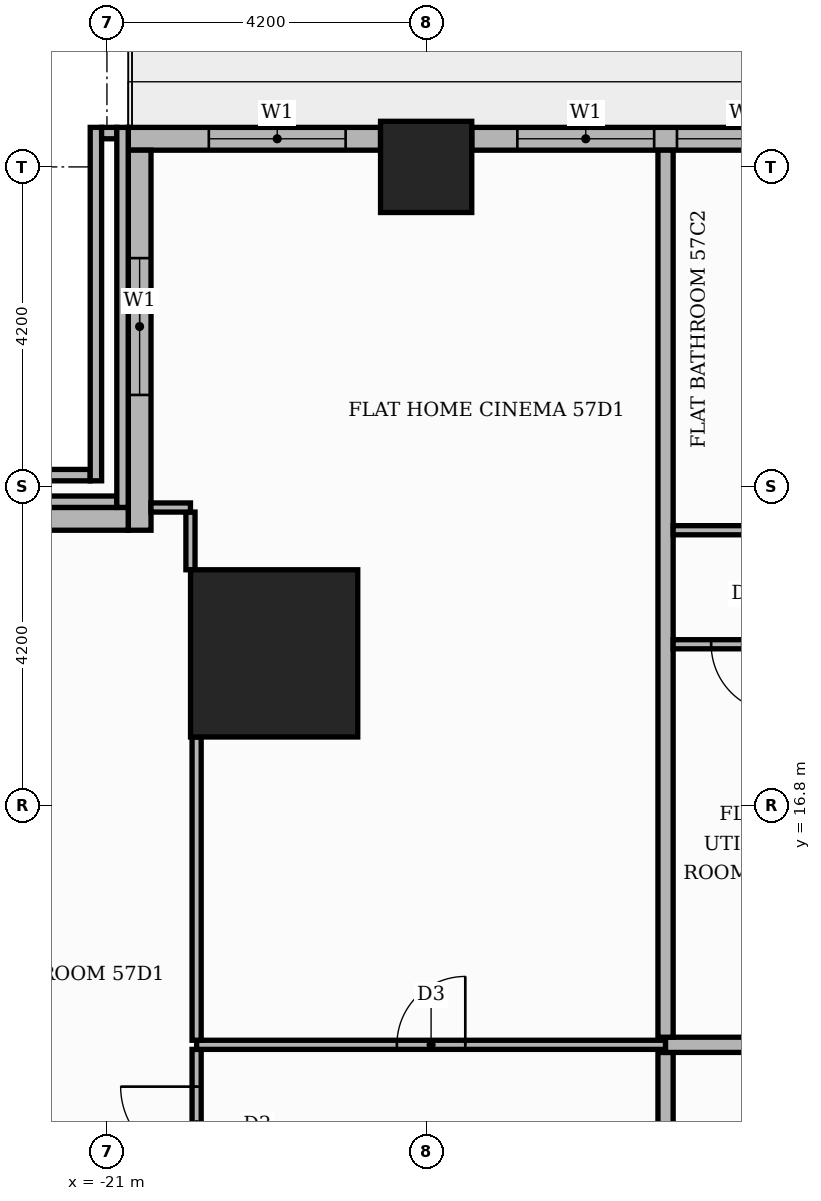
"""IFC4 building model, lengths in metres.
Left out: names, types, materials, properties, quantities, classifications, styles, units other than length and angle.
Written with IfcOpenShell. Run it as: python <this file> out.ifc"""

import sys

from ifc_helpers import new_model, si_unit, direction, frame, frame_2d, origin, origin_2d, place, context, subcontext, project, spatial, rectangle, extrude, element, fill, save


model = new_model("IFC4")
c1 = context("Model", 3, precision=1e-05, world=origin(), true_north=direction((0.0, 1.0)))
c2 = subcontext(c1, "Body", "Model", "MODEL_VIEW")
j1 = project(units=[si_unit("LENGTHUNIT", "METRE"), si_unit("PLANEANGLEUNIT", "RADIAN")], contexts=[c1])
p1 = place(None, origin())
s1 = spatial("IfcSite", under=j1, at=p1, CompositionType="ELEMENT")
p2 = place(p1, origin())
s2 = spatial("IfcBuilding", under=s1, at=p2, CompositionType="ELEMENT")
p3 = place(p2, frame((0.0, 0.0, 240.6)))
s3 = spatial("IfcBuildingStorey", under=s2, at=p3, CompositionType="ELEMENT", Elevation=240.6)
p4 = place(p3, frame((-18.8, 18.8, 0.0), z_axis=(0.0, 0.0, 1.0), x_axis=(1.0, 0.0, 0.0)))
e1 = element("IfcColumn", 1, at=p4, inside=s3, PredefinedType="COLUMN", context=c2, shape_type="SweptSolid", body=[
    extrude(rectangle(XDim=2.2, YDim=2.2, at=origin_2d()), origin(), (0.0, 0.0, 1.0), 3.9),
])
p5 = place(p3, frame((-16.8, 25.2, 0.0), z_axis=(0.0, 0.0, 1.0), x_axis=(1.0, 0.0, 0.0)))
e2 = element("IfcColumn", 2, at=p5, inside=s3, PredefinedType="COLUMN", context=c2, shape_type="SweptSolid", body=[
    extrude(rectangle(XDim=1.2, YDim=1.2, at=origin_2d()), origin(), (0.0, 0.0, 1.0), 3.9),
])
p6 = place(p3, frame((-9.0, 25.57, 0.0), z_axis=(0.0, 0.0, 1.0), x_axis=(-1.0, 0.0, 0.0)))
e3 = element("IfcWall", 3, at=p6, inside=s3, PredefinedType="STANDARD", context=c2, shape_type="SweptSolid", body=[
    extrude(rectangle(XDim=7.2, YDim=0.3, at=frame_2d((3.6, 0.0))), origin(), (0.0, 0.0, 1.0), 3.48),
])
p7 = place(p6, frame((0.6, 0.0, 0.9)))
e4 = element("IfcOpeningElement", 4, at=p7, cuts=e3, PredefinedType="OPENING", context=c2, shape_type="SweptSolid", body=[
    extrude(rectangle(XDim=1.8, YDim=2.1, at=frame_2d((0.9, 1.05))), frame((0.0, 0.16, 0.0), z_axis=(0.0, -1.0, 0.0), x_axis=(1.0, 0.0, 0.0)), (0.0, 0.0, 1.0), 0.32),
])
p8 = place(p6, frame((2.7, 0.0, 0.9)))
e5 = element("IfcOpeningElement", 5, at=p8, cuts=e3, PredefinedType="OPENING", context=c2, shape_type="SweptSolid", body=[
    extrude(rectangle(XDim=1.8, YDim=2.1, at=frame_2d((0.9, 1.05))), frame((0.0, 0.16, 0.0), z_axis=(0.0, -1.0, 0.0), x_axis=(1.0, 0.0, 0.0)), (0.0, 0.0, 1.0), 0.32),
])
p9 = place(p6, frame((4.8, 0.0, 0.9)))
e6 = element("IfcOpeningElement", 6, at=p9, cuts=e3, PredefinedType="OPENING", context=c2, shape_type="SweptSolid", body=[
    extrude(rectangle(XDim=1.8, YDim=2.1, at=frame_2d((0.9, 1.05))), frame((0.0, 0.16, 0.0), z_axis=(0.0, -1.0, 0.0), x_axis=(1.0, 0.0, 0.0)), (0.0, 0.0, 1.0), 0.32),
])
p10 = place(p3, frame((-17.4, 25.57, 0.0), z_axis=(0.0, 0.0, 1.0), x_axis=(-1.0, 0.0, 0.0)))
e7 = element("IfcWall", 7, at=p10, inside=s3, PredefinedType="STANDARD", context=c2, shape_type="SweptSolid", body=[
    extrude(rectangle(XDim=3.32, YDim=0.3, at=frame_2d((1.66, 0.0))), origin(), (0.0, 0.0, 1.0), 3.48),
])
p11 = place(p10, frame((0.459, 0.0, 0.9)))
e8 = element("IfcOpeningElement", 8, at=p11, cuts=e7, PredefinedType="OPENING", context=c2, shape_type="SweptSolid", body=[
    extrude(rectangle(XDim=1.8, YDim=2.1, at=frame_2d((0.9, 1.05))), frame((0.0, 0.16, 0.0), z_axis=(0.0, -1.0, 0.0), x_axis=(1.0, 0.0, 0.0)), (0.0, 0.0, 1.0), 0.32),
])
p12 = place(p3, frame((-20.57, 25.42, 0.0), z_axis=(0.0, 0.0, 1.0), x_axis=(0.0, -1.0, 0.0)))
e9 = element("IfcWall", 9, at=p12, inside=s3, PredefinedType="STANDARD", context=c2, shape_type="SweptSolid", body=[
    extrude(rectangle(XDim=5.0, YDim=0.3, at=frame_2d((2.5, 0.0))), origin(), (0.0, 0.0, 1.0), 3.48),
])
p13 = place(p12, frame((1.42, 0.0, 0.9)))
e10 = element("IfcOpeningElement", 10, at=p13, cuts=e9, PredefinedType="OPENING", context=c2, shape_type="SweptSolid", body=[
    extrude(rectangle(XDim=1.8, YDim=2.1, at=frame_2d((0.9, 1.05))), frame((0.0, 0.16, 0.0), z_axis=(0.0, -1.0, 0.0), x_axis=(1.0, 0.0, 0.0)), (0.0, 0.0, 1.0), 0.32),
])
p14 = place(p3, frame((-20.72, 20.57, 0.0), z_axis=(0.0, 0.0, 1.0), x_axis=(-1.0, 0.0, 0.0)))
e11 = element("IfcWall", 11, at=p14, inside=s3, PredefinedType="STANDARD", context=c2, shape_type="SweptSolid", body=[
    extrude(rectangle(XDim=5.0, YDim=0.3, at=frame_2d((2.5, 0.0))), origin(), (0.0, 0.0, 1.0), 3.48),
])
p15 = place(p14, frame((1.48, 0.0, 0.9)))
e12 = element("IfcOpeningElement", 12, at=p15, cuts=e11, PredefinedType="OPENING", context=c2, shape_type="SweptSolid", body=[
    extrude(rectangle(XDim=1.8, YDim=2.1, at=frame_2d((0.9, 1.05))), frame((0.0, 0.16, 0.0), z_axis=(0.0, -1.0, 0.0), x_axis=(1.0, 0.0, 0.0)), (0.0, 0.0, 1.0), 0.32),
])
p16 = place(p3, frame((-25.57, 21.145, 0.0), z_axis=(0.0, 0.0, 1.0), x_axis=(1.0, 0.0, 0.0)))
e13 = element("IfcWall", 13, at=p16, inside=s3, PredefinedType="PARAPET", context=c2, shape_type="SweptSolid", body=[
    extrude(rectangle(XDim=4.35, YDim=0.15, at=frame_2d((2.175, 0.0))), origin(), (0.0, 0.0, 1.0), 1.1),
])
p17 = place(p3, frame((-25.57, 20.795, 0.0), z_axis=(0.0, 0.0, 1.0), x_axis=(1.0, 0.0, 0.0)))
e14 = element("IfcWall", 14, at=p17, inside=s3, PredefinedType="PARAPET", context=c2, shape_type="SweptSolid", body=[
    extrude(rectangle(XDim=4.7, YDim=0.15, at=frame_2d((2.35, 0.0))), origin(), (0.0, 0.0, 1.0), 1.1),
])
p18 = place(p3, frame((-21.145, 21.07, 0.0), z_axis=(0.0, 0.0, 1.0), x_axis=(0.0, 1.0, 0.0)))
e15 = element("IfcWall", 15, at=p18, inside=s3, PredefinedType="PARAPET", context=c2, shape_type="SweptSolid", body=[
    extrude(rectangle(XDim=4.65, YDim=0.15, at=frame_2d((2.325, 0.0))), origin(), (0.0, 0.0, 1.0), 1.1),
])
p19 = place(p3, frame((-21.07, 25.645, 0.0), z_axis=(0.0, 0.0, 1.0), x_axis=(1.0, 0.0, 0.0)))
e16 = element("IfcWall", 16, at=p19, inside=s3, PredefinedType="PARAPET", context=c2, shape_type="SweptSolid", body=[
    extrude(rectangle(XDim=0.2, YDim=0.15, at=frame_2d((0.1, 0.0))), origin(), (0.0, 0.0, 1.0), 1.1),
])
p20 = place(p3, frame((-20.795, 20.72, 0.0), z_axis=(0.0, 0.0, 1.0), x_axis=(0.0, 1.0, 0.0)))
e17 = element("IfcWall", 17, at=p20, inside=s3, PredefinedType="PARAPET", context=c2, shape_type="SweptSolid", body=[
    extrude(rectangle(XDim=5.0, YDim=0.15, at=frame_2d((2.5, 0.0))), origin(), (0.0, 0.0, 1.0), 1.1),
])
p21 = place(p3, frame((-13.65, 11.1, 0.0), z_axis=(0.0, 0.0, 1.0), x_axis=(0.0, 1.0, 0.0)))
e18 = element("IfcWall", 18, at=p21, inside=s3, PredefinedType="PARTITIONING", context=c2, shape_type="SweptSolid", body=[
    extrude(rectangle(XDim=2.45, YDim=0.2, at=frame_2d((1.225, 0.0))), origin(), (0.0, 0.0, 1.0), 3.48),
])
p22 = place(p3, frame((-19.82, 11.61, 0.0), z_axis=(0.0, 0.0, 1.0), x_axis=(0.0, 1.0, 0.0)))
e19 = element("IfcWall", 19, at=p22, inside=s3, PredefinedType="PARTITIONING", context=c2, shape_type="SweptSolid", body=[
    extrude(rectangle(XDim=1.98, YDim=0.12, at=frame_2d((0.99, 0.0))), origin(), (0.0, 0.0, 1.0), 3.48),
])
p23 = place(p22, frame((0.49, 0.0, 0.0)))
e20 = element("IfcOpeningElement", 20, at=p23, cuts=e19, PredefinedType="OPENING", context=c2, shape_type="SweptSolid", body=[
    extrude(rectangle(XDim=1.0, YDim=2.1, at=frame_2d((0.5, 1.05))), frame((0.0, 0.07, 0.0), z_axis=(0.0, -1.0, 0.0), x_axis=(1.0, 0.0, 0.0)), (0.0, 0.0, 1.0), 0.14),
])
p24 = place(p3, frame((-19.82, 13.65, 0.0), z_axis=(0.0, 0.0, 1.0), x_axis=(1.0, 0.0, 0.0)))
e21 = element("IfcWall", 21, at=p24, inside=s3, PredefinedType="PARTITIONING", context=c2, shape_type="SweptSolid", body=[
    extrude(rectangle(XDim=6.17, YDim=0.12, at=frame_2d((3.085, 0.0))), origin(), (0.0, 0.0, 1.0), 3.48),
])
p25 = place(p24, frame((2.635, 0.0, 0.0)))
e22 = element("IfcOpeningElement", 22, at=p25, cuts=e21, PredefinedType="OPENING", context=c2, shape_type="SweptSolid", body=[
    extrude(rectangle(XDim=0.9, YDim=2.1, at=frame_2d((0.45, 1.05))), frame((0.0, 0.07, 0.0), z_axis=(0.0, -1.0, 0.0), x_axis=(1.0, 0.0, 0.0)), (0.0, 0.0, 1.0), 0.14),
])
p26 = place(p3, frame((-13.65, 13.65, 0.0), z_axis=(0.0, 0.0, 1.0), x_axis=(1.0, 0.0, 0.0)))
e23 = element("IfcWall", 23, at=p26, inside=s3, PredefinedType="PARTITIONING", context=c2, shape_type="SweptSolid", body=[
    extrude(rectangle(XDim=39.07, YDim=0.2, at=frame_2d((19.535, 0.0))), origin(), (0.0, 0.0, 1.0), 3.48),
])
p27 = place(p26, frame((24.65, 0.0, 0.0)))
e24 = element("IfcOpeningElement", 24, at=p27, cuts=e23, PredefinedType="OPENING", context=c2, shape_type="SweptSolid", body=[
    extrude(rectangle(XDim=1.1, YDim=2.4, at=frame_2d((0.55, 1.2))), frame((0.0, 0.11, 0.0), z_axis=(0.0, -1.0, 0.0), x_axis=(1.0, 0.0, 0.0)), (0.0, 0.0, 1.0), 0.22),
])
p28 = place(p26, frame((12.05, 0.0, 0.0)))
e25 = element("IfcOpeningElement", 25, at=p28, cuts=e23, PredefinedType="OPENING", context=c2, shape_type="SweptSolid", body=[
    extrude(rectangle(XDim=1.1, YDim=2.4, at=frame_2d((0.55, 1.2))), frame((0.0, 0.11, 0.0), z_axis=(0.0, -1.0, 0.0), x_axis=(1.0, 0.0, 0.0)), (0.0, 0.0, 1.0), 0.22),
])
p29 = place(p3, frame((-19.82, 13.71, 0.0), z_axis=(0.0, 0.0, 1.0), x_axis=(0.0, 1.0, 0.0)))
e26 = element("IfcWall", 26, at=p29, inside=s3, PredefinedType="PARTITIONING", context=c2, shape_type="SweptSolid", body=[
    extrude(rectangle(XDim=3.99, YDim=0.12, at=frame_2d((1.995, 0.0))), origin(), (0.0, 0.0, 1.0), 3.48),
])
p30 = place(p3, frame((-13.65, 13.75, 0.0), z_axis=(0.0, 0.0, 1.0), x_axis=(0.0, 1.0, 0.0)))
e27 = element("IfcWall", 27, at=p30, inside=s3, PredefinedType="PARTITIONING", context=c2, shape_type="SweptSolid", body=[
    extrude(rectangle(XDim=11.67, YDim=0.2, at=frame_2d((5.835, 0.0))), origin(), (0.0, 0.0, 1.0), 3.48),
])
p31 = place(p3, frame((-13.55, 18.92, 0.0), z_axis=(0.0, 0.0, 1.0), x_axis=(1.0, 0.0, 0.0)))
e28 = element("IfcWall", 28, at=p31, inside=s3, PredefinedType="PARTITIONING", context=c2, shape_type="SweptSolid", body=[
    extrude(rectangle(XDim=10.4, YDim=0.12, at=frame_2d((5.2, 0.0))), origin(), (0.0, 0.0, 1.0), 3.48),
])
p32 = place(p31, frame((6.8, 0.0, 0.0)))
e29 = element("IfcOpeningElement", 29, at=p32, cuts=e28, PredefinedType="OPENING", context=c2, shape_type="SweptSolid", body=[
    extrude(rectangle(XDim=0.9, YDim=2.1, at=frame_2d((0.45, 1.05))), frame((0.0, 0.07, 0.0), z_axis=(0.0, -1.0, 0.0), x_axis=(1.0, 0.0, 0.0)), (0.0, 0.0, 1.0), 0.14),
])
p33 = place(p31, frame((2.6, 0.0, 0.0)))
e30 = element("IfcOpeningElement", 30, at=p33, cuts=e28, PredefinedType="OPENING", context=c2, shape_type="SweptSolid", body=[
    extrude(rectangle(XDim=0.9, YDim=2.1, at=frame_2d((0.45, 1.05))), frame((0.0, 0.07, 0.0), z_axis=(0.0, -1.0, 0.0), x_axis=(1.0, 0.0, 0.0)), (0.0, 0.0, 1.0), 0.14),
])
p34 = place(p31, frame((0.5, 0.0, 0.0)))
e31 = element("IfcOpeningElement", 31, at=p34, cuts=e28, PredefinedType="OPENING", context=c2, shape_type="SweptSolid", body=[
    extrude(rectangle(XDim=0.9, YDim=2.1, at=frame_2d((0.45, 1.05))), frame((0.0, 0.07, 0.0), z_axis=(0.0, -1.0, 0.0), x_axis=(1.0, 0.0, 0.0)), (0.0, 0.0, 1.0), 0.14),
])
p35 = place(p3, frame((-19.901, 19.9, 0.0), z_axis=(0.0, 0.0, 1.0), x_axis=(0.0, 1.0, 0.0)))
e32 = element("IfcWall", 32, at=p35, inside=s3, PredefinedType="PARTITIONING", context=c2, shape_type="SweptSolid", body=[
    extrude(rectangle(XDim=0.759, YDim=0.12, at=frame_2d((0.379, 0.0))), origin(), (0.0, 0.0, 1.0), 3.48),
])
p36 = place(p3, frame((-13.55, 20.42, 0.0), z_axis=(0.0, 0.0, 1.0), x_axis=(1.0, 0.0, 0.0)))
e33 = element("IfcWall", 33, at=p36, inside=s3, PredefinedType="PARTITIONING", context=c2, shape_type="SweptSolid", body=[
    extrude(rectangle(XDim=18.7, YDim=0.12, at=frame_2d((9.35, 0.0))), origin(), (0.0, 0.0, 1.0), 3.48),
])
p37 = place(p36, frame((16.2, 0.0, 0.0)))
e34 = element("IfcOpeningElement", 34, at=p37, cuts=e33, PredefinedType="OPENING", context=c2, shape_type="SweptSolid", body=[
    extrude(rectangle(XDim=1.0, YDim=2.1, at=frame_2d((0.5, 1.05))), frame((0.0, 0.07, 0.0), z_axis=(0.0, -1.0, 0.0), x_axis=(1.0, 0.0, 0.0)), (0.0, 0.0, 1.0), 0.14),
])
p38 = place(p36, frame((12.05, 0.0, 0.0)))
e35 = element("IfcOpeningElement", 35, at=p38, cuts=e33, PredefinedType="OPENING", context=c2, shape_type="SweptSolid", body=[
    extrude(rectangle(XDim=0.9, YDim=2.1, at=frame_2d((0.45, 1.05))), frame((0.0, 0.07, 0.0), z_axis=(0.0, -1.0, 0.0), x_axis=(1.0, 0.0, 0.0)), (0.0, 0.0, 1.0), 0.14),
])
p39 = place(p36, frame((3.65, 0.0, 0.0)))
e36 = element("IfcOpeningElement", 36, at=p39, cuts=e33, PredefinedType="OPENING", context=c2, shape_type="SweptSolid", body=[
    extrude(rectangle(XDim=0.9, YDim=2.1, at=frame_2d((0.45, 1.05))), frame((0.0, 0.07, 0.0), z_axis=(0.0, -1.0, 0.0), x_axis=(1.0, 0.0, 0.0)), (0.0, 0.0, 1.0), 0.14),
])
p40 = place(p3, frame((-20.421, 20.719, 0.0), z_axis=(0.0, 0.0, 1.0), x_axis=(1.0, 0.0, 0.0)))
e37 = element("IfcWall", 37, at=p40, inside=s3, PredefinedType="PARTITIONING", context=c2, shape_type="SweptSolid", body=[
    extrude(rectangle(XDim=0.52, YDim=0.12, at=frame_2d((0.26, 0.0))), origin(), (0.0, 0.0, 1.0), 3.48),
])
p41 = place(p8, origin())
e38 = element("IfcWindow", 38, at=p41, inside=s3, PartitioningType="SINGLE_PANEL", PredefinedType="WINDOW", context=c2, shape_type="SweptSolid", body=[
    extrude(rectangle(XDim=1.8, YDim=2.1, at=frame_2d((0.9, 1.05))), frame((0.0, 0.03, 0.0), z_axis=(0.0, -1.0, 0.0), x_axis=(1.0, 0.0, 0.0)), (0.0, 0.0, 1.0), 0.06),
])
fill(e5, e38)
p42 = place(p9, origin())
e39 = element("IfcWindow", 39, at=p42, inside=s3, PartitioningType="SINGLE_PANEL", PredefinedType="WINDOW", context=c2, shape_type="SweptSolid", body=[
    extrude(rectangle(XDim=1.8, YDim=2.1, at=frame_2d((0.9, 1.05))), frame((0.0, 0.03, 0.0), z_axis=(0.0, -1.0, 0.0), x_axis=(1.0, 0.0, 0.0)), (0.0, 0.0, 1.0), 0.06),
])
fill(e6, e39)
p43 = place(p11, origin())
e40 = element("IfcWindow", 40, at=p43, inside=s3, PartitioningType="SINGLE_PANEL", PredefinedType="WINDOW", context=c2, shape_type="SweptSolid", body=[
    extrude(rectangle(XDim=1.8, YDim=2.1, at=frame_2d((0.9, 1.05))), frame((0.0, 0.03, 0.0), z_axis=(0.0, -1.0, 0.0), x_axis=(1.0, 0.0, 0.0)), (0.0, 0.0, 1.0), 0.06),
])
fill(e8, e40)
p44 = place(p13, origin())
e41 = element("IfcWindow", 41, at=p44, inside=s3, PartitioningType="SINGLE_PANEL", PredefinedType="WINDOW", context=c2, shape_type="SweptSolid", body=[
    extrude(rectangle(XDim=1.8, YDim=2.1, at=frame_2d((0.9, 1.05))), frame((0.0, 0.03, 0.0), z_axis=(0.0, -1.0, 0.0), x_axis=(1.0, 0.0, 0.0)), (0.0, 0.0, 1.0), 0.06),
])
fill(e10, e41)
p45 = place(p34, frame((0.9, 0.0, 0.0), z_axis=(0.0, 0.0, 1.0), x_axis=(-1.0, 0.0, 0.0)))
e42 = element("IfcDoor", 42, at=p45, inside=s3, OperationType="SINGLE_SWING_RIGHT", PredefinedType="DOOR", context=c2, shape_type="SweptSolid", body=[
    extrude(rectangle(XDim=0.9, YDim=2.1, at=frame_2d((0.45, 1.05))), frame((0.0, 0.025, 0.0), z_axis=(0.0, -1.0, 0.0), x_axis=(1.0, 0.0, 0.0)), (0.0, 0.0, 1.0), 0.05),
])
fill(e31, e42)
p46 = place(p25, origin())
e43 = element("IfcDoor", 43, at=p46, inside=s3, OperationType="SINGLE_SWING_RIGHT", PredefinedType="DOOR", context=c2, shape_type="SweptSolid", body=[
    extrude(rectangle(XDim=0.9, YDim=2.1, at=frame_2d((0.45, 1.05))), frame((0.0, 0.025, 0.0), z_axis=(0.0, -1.0, 0.0), x_axis=(1.0, 0.0, 0.0)), (0.0, 0.0, 1.0), 0.05),
])
fill(e22, e43)
p47 = place(p23, origin())
e44 = element("IfcDoor", 44, at=p47, inside=s3, OperationType="SINGLE_SWING_RIGHT", PredefinedType="DOOR", context=c2, shape_type="SweptSolid", body=[
    extrude(rectangle(XDim=1.0, YDim=2.1, at=frame_2d((0.5, 1.05))), frame((0.0, 0.025, 0.0), z_axis=(0.0, -1.0, 0.0), x_axis=(1.0, 0.0, 0.0)), (0.0, 0.0, 1.0), 0.05),
])
fill(e20, e44)
save(model, sys.argv[1])
